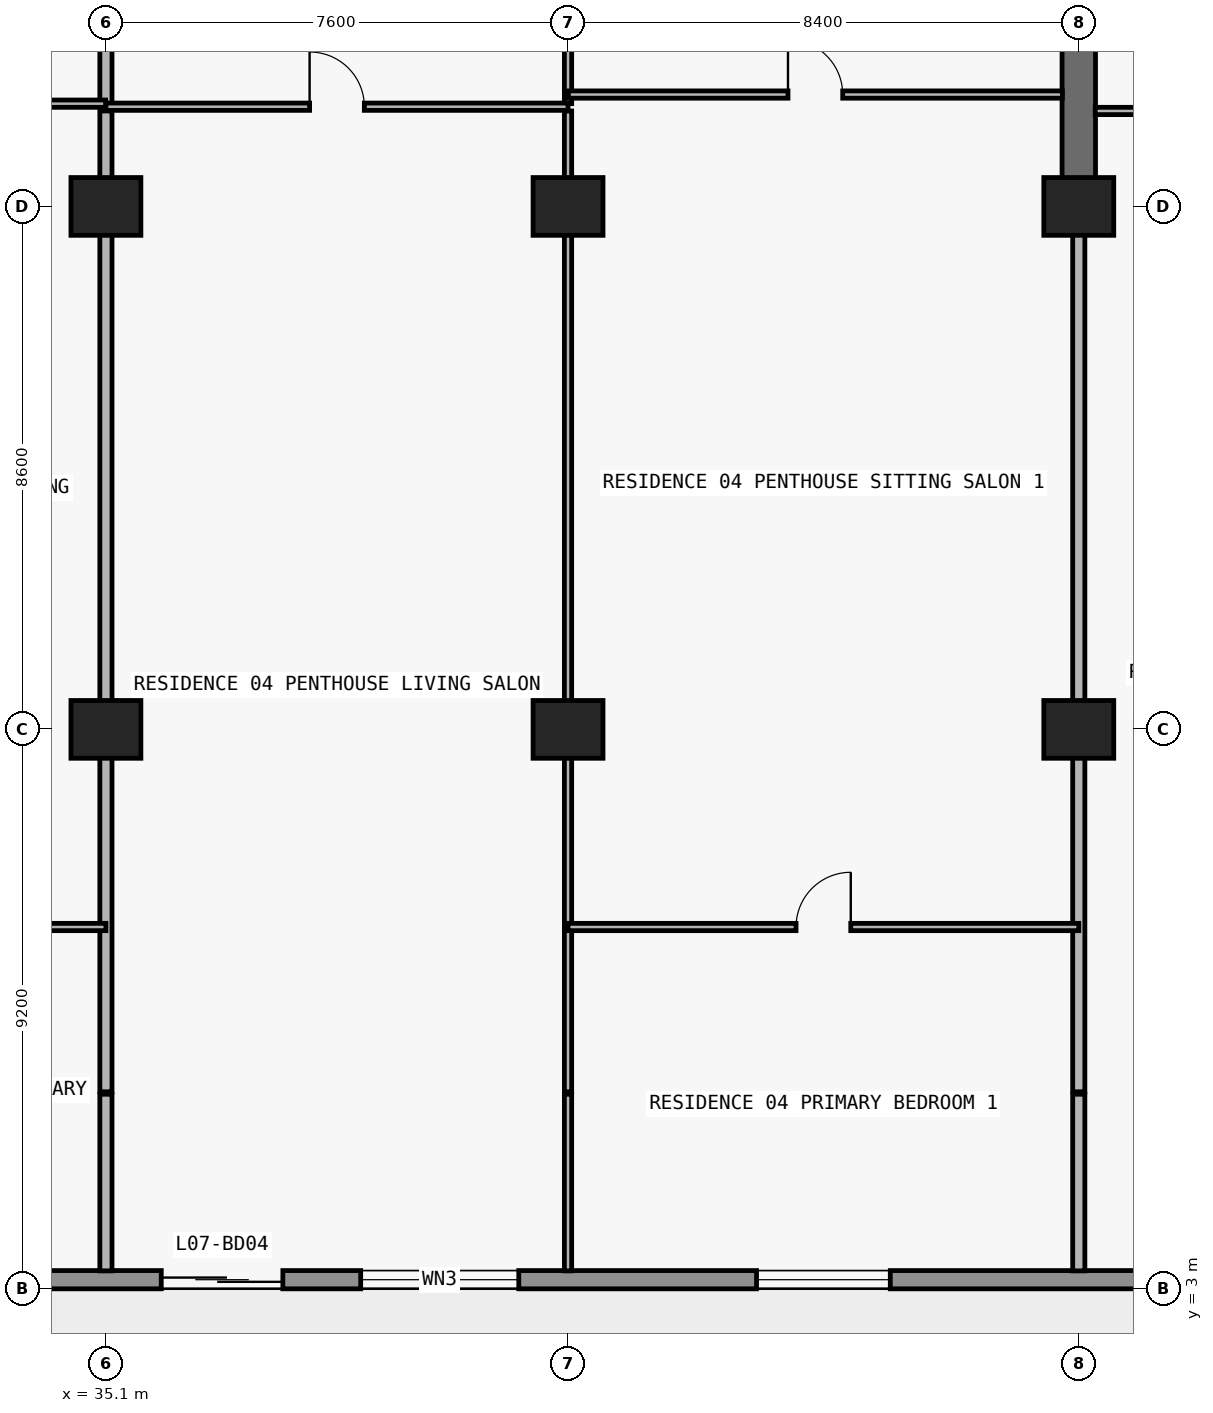
"""IFC4 building model, lengths in metres.
Left out: names, types, materials, properties, quantities, classifications, styles, units other than length and angle.
Written with IfcOpenShell. Run it as: python <this file> out.ifc"""

import sys

from ifc_helpers import new_model, si_unit, direction, frame, frame_2d, origin, origin_2d, place, context, subcontext, project, spatial, rectangle, extrude, element, fill, save


model = new_model("IFC4")
c1 = context("Model", 3, precision=1e-05, world=origin(), true_north=direction((0.0, 1.0)))
c2 = subcontext(c1, "Body", "Model", "MODEL_VIEW")
j1 = project(units=[si_unit("LENGTHUNIT", "METRE"), si_unit("PLANEANGLEUNIT", "RADIAN")], contexts=[c1])
p1 = place(None, origin())
s1 = spatial("IfcSite", under=j1, at=p1, CompositionType="ELEMENT")
p2 = place(p1, origin())
s2 = spatial("IfcBuilding", under=s1, at=p2, CompositionType="ELEMENT")
p3 = place(p2, frame((0.0, 0.0, 33.3)))
s3 = spatial("IfcBuildingStorey", under=s2, at=p3, CompositionType="ELEMENT", Elevation=33.3)
for number, where, z_axis, x_axis in (
    (1, (35.1, 12.2, 0.0), (0.0, 0.0, 1.0), (1.0, 0.0, 0.0)),
    (2, (42.7, 12.2, 0.0), (0.0, 0.0, 1.0), (1.0, 0.0, 0.0)),
    (3, (51.1, 12.2, 0.0), (0.0, 0.0, 1.0), (1.0, 0.0, 0.0)),
    (4, (35.1, 20.8, 0.0), (0.0, 0.0, 1.0), (1.0, 0.0, 0.0)),
    (5, (42.7, 20.8, 0.0), (0.0, 0.0, 1.0), (1.0, 0.0, 0.0)),
    (6, (51.1, 20.8, 0.0), (0.0, 0.0, 1.0), (1.0, 0.0, 0.0)),
):
    element("IfcColumn", number, at=place(p3, frame(where, z_axis=z_axis, x_axis=x_axis)), inside=s3, PredefinedType="COLUMN", context=c2, shape_type="SweptSolid", body=[
        extrude(rectangle(XDim=1.15, YDim=0.95, at=origin_2d()), origin(), (0.0, 0.0, 1.0), 3.05),
    ])
p4 = place(p3, frame((51.1, 20.8, 0.0), z_axis=(0.0, 0.0, 1.0), x_axis=(0.0, 1.0, 0.0)))
e7 = element("IfcWall", 7, at=p4, inside=s3, PredefinedType="SHEAR", context=c2, shape_type="SweptSolid", body=[
    extrude(rectangle(XDim=8.6, YDim=0.55, at=frame_2d((4.3, 0.0))), origin(), (0.0, 0.0, 1.0), 3.05),
])
p5 = place(p3, frame((72.7, 3.15, 0.0), z_axis=(0.0, 0.0, 1.0), x_axis=(-1.0, 0.0, 0.0)))
e8 = element("IfcWall", 8, at=p5, inside=s3, PredefinedType="STANDARD", context=c2, shape_type="SweptSolid", body=[
    extrude(rectangle(XDim=67.6, YDim=0.3, at=frame_2d((33.8, 0.0))), origin(), (0.0, 0.0, 1.0), 3.05),
])
p6 = place(p5, frame((59.826, 0.0, 0.0)))
e9 = element("IfcOpeningElement", 9, at=p6, cuts=e8, PredefinedType="OPENING", context=c2, shape_type="SweptSolid", body=[
    extrude(rectangle(XDim=2.0, YDim=2.3, at=frame_2d((1.0, 1.15))), frame((0.0, 0.16, 0.0), z_axis=(0.0, -1.0, 0.0), x_axis=(1.0, 0.0, 0.0)), (0.0, 0.0, 1.0), 0.32),
])
p7 = place(p5, frame((55.526, 0.0, 0.85)))
e10 = element("IfcOpeningElement", 10, at=p7, cuts=e8, PredefinedType="OPENING", context=c2, shape_type="SweptSolid", body=[
    extrude(rectangle(XDim=2.2, YDim=1.55, at=frame_2d((1.1, 0.775))), frame((0.0, 0.16, 0.0), z_axis=(0.0, -1.0, 0.0), x_axis=(1.0, 0.0, 0.0)), (0.0, 0.0, 1.0), 0.32),
])
p8 = place(p5, frame((51.09, 0.0, 0.0)))
e11 = element("IfcOpeningElement", 11, at=p8, cuts=e8, PredefinedType="OPENING", context=c2, shape_type="SweptSolid", body=[
    extrude(rectangle(XDim=2.0, YDim=2.3, at=frame_2d((1.0, 1.15))), frame((0.0, 0.16, 0.0), z_axis=(0.0, -1.0, 0.0), x_axis=(1.0, 0.0, 0.0)), (0.0, 0.0, 1.0), 0.32),
])
p9 = place(p5, frame((46.99, 0.0, 0.85)))
e12 = element("IfcOpeningElement", 12, at=p9, cuts=e8, PredefinedType="OPENING", context=c2, shape_type="SweptSolid", body=[
    extrude(rectangle(XDim=1.8, YDim=1.55, at=frame_2d((0.9, 0.775))), frame((0.0, 0.16, 0.0), z_axis=(0.0, -1.0, 0.0), x_axis=(1.0, 0.0, 0.0)), (0.0, 0.0, 1.0), 0.32),
])
p10 = place(p5, frame((43.026, 0.0, 0.0)))
e13 = element("IfcOpeningElement", 13, at=p10, cuts=e8, PredefinedType="OPENING", context=c2, shape_type="SweptSolid", body=[
    extrude(rectangle(XDim=2.0, YDim=2.3, at=frame_2d((1.0, 1.15))), frame((0.0, 0.16, 0.0), z_axis=(0.0, -1.0, 0.0), x_axis=(1.0, 0.0, 0.0)), (0.0, 0.0, 1.0), 0.32),
])
p11 = place(p5, frame((38.726, 0.0, 0.85)))
e14 = element("IfcOpeningElement", 14, at=p11, cuts=e8, PredefinedType="OPENING", context=c2, shape_type="SweptSolid", body=[
    extrude(rectangle(XDim=2.2, YDim=1.55, at=frame_2d((1.1, 0.775))), frame((0.0, 0.16, 0.0), z_axis=(0.0, -1.0, 0.0), x_axis=(1.0, 0.0, 0.0)), (0.0, 0.0, 1.0), 0.32),
])
p12 = place(p5, frame((34.69, 0.0, 0.0)))
e15 = element("IfcOpeningElement", 15, at=p12, cuts=e8, PredefinedType="OPENING", context=c2, shape_type="SweptSolid", body=[
    extrude(rectangle(XDim=2.0, YDim=2.3, at=frame_2d((1.0, 1.15))), frame((0.0, 0.16, 0.0), z_axis=(0.0, -1.0, 0.0), x_axis=(1.0, 0.0, 0.0)), (0.0, 0.0, 1.0), 0.32),
])
p13 = place(p5, frame((30.81, 0.0, 0.65)))
e16 = element("IfcOpeningElement", 16, at=p13, cuts=e8, PredefinedType="OPENING", context=c2, shape_type="SweptSolid", body=[
    extrude(rectangle(XDim=2.6, YDim=1.85, at=frame_2d((1.3, 0.925))), frame((0.0, 0.16, 0.0), z_axis=(0.0, -1.0, 0.0), x_axis=(1.0, 0.0, 0.0)), (0.0, 0.0, 1.0), 0.32),
])
p14 = place(p5, frame((24.7, 0.0, 0.85)))
e17 = element("IfcOpeningElement", 17, at=p14, cuts=e8, PredefinedType="OPENING", context=c2, shape_type="SweptSolid", body=[
    extrude(rectangle(XDim=2.2, YDim=1.55, at=frame_2d((1.1, 0.775))), frame((0.0, 0.16, 0.0), z_axis=(0.0, -1.0, 0.0), x_axis=(1.0, 0.0, 0.0)), (0.0, 0.0, 1.0), 0.32),
])
p15 = place(p5, frame((18.626, 0.0, 0.0)))
e18 = element("IfcOpeningElement", 18, at=p15, cuts=e8, PredefinedType="OPENING", context=c2, shape_type="SweptSolid", body=[
    extrude(rectangle(XDim=2.0, YDim=2.3, at=frame_2d((1.0, 1.15))), frame((0.0, 0.16, 0.0), z_axis=(0.0, -1.0, 0.0), x_axis=(1.0, 0.0, 0.0)), (0.0, 0.0, 1.0), 0.32),
])
p16 = place(p5, frame((14.326, 0.0, 0.85)))
e19 = element("IfcOpeningElement", 19, at=p16, cuts=e8, PredefinedType="OPENING", context=c2, shape_type="SweptSolid", body=[
    extrude(rectangle(XDim=2.2, YDim=1.55, at=frame_2d((1.1, 0.775))), frame((0.0, 0.16, 0.0), z_axis=(0.0, -1.0, 0.0), x_axis=(1.0, 0.0, 0.0)), (0.0, 0.0, 1.0), 0.32),
])
p17 = place(p5, frame((9.89, 0.0, 0.0)))
e20 = element("IfcOpeningElement", 20, at=p17, cuts=e8, PredefinedType="OPENING", context=c2, shape_type="SweptSolid", body=[
    extrude(rectangle(XDim=2.0, YDim=2.3, at=frame_2d((1.0, 1.15))), frame((0.0, 0.16, 0.0), z_axis=(0.0, -1.0, 0.0), x_axis=(1.0, 0.0, 0.0)), (0.0, 0.0, 1.0), 0.32),
])
p18 = place(p5, frame((5.79, 0.0, 0.85)))
e21 = element("IfcOpeningElement", 21, at=p18, cuts=e8, PredefinedType="OPENING", context=c2, shape_type="SweptSolid", body=[
    extrude(rectangle(XDim=1.8, YDim=1.55, at=frame_2d((0.9, 0.775))), frame((0.0, 0.16, 0.0), z_axis=(0.0, -1.0, 0.0), x_axis=(1.0, 0.0, 0.0)), (0.0, 0.0, 1.0), 0.32),
])
p19 = place(p3, frame((35.1, 3.295, 0.0), z_axis=(0.0, 0.0, 1.0), x_axis=(0.0, 1.0, 0.0)))
e22 = element("IfcWall", 22, at=p19, inside=s3, PredefinedType="PARTITIONING", context=c2, shape_type="SweptSolid", body=[
    extrude(rectangle(XDim=2.905, YDim=0.2, at=frame_2d((1.453, 0.0))), origin(), (0.0, 0.0, 1.0), 3.05),
])
p20 = place(p3, frame((35.1, 6.24, 0.0), z_axis=(0.0, 0.0, 1.0), x_axis=(0.0, 1.0, 0.0)))
e23 = element("IfcWall", 23, at=p20, inside=s3, PredefinedType="PARTITIONING", context=c2, shape_type="SweptSolid", body=[
    extrude(rectangle(XDim=16.13, YDim=0.2, at=frame_2d((8.065, 0.0))), origin(), (0.0, 0.0, 1.0), 2.11),
])
p21 = place(p3, frame((35.1, 22.49, 0.0), z_axis=(0.0, 0.0, 1.0), x_axis=(0.0, 1.0, 0.0)))
e24 = element("IfcWall", 24, at=p21, inside=s3, PredefinedType="PARTITIONING", context=c2, shape_type="SweptSolid", body=[
    extrude(rectangle(XDim=4.69, YDim=0.2, at=frame_2d((2.345, 0.0))), origin(), (0.0, 0.0, 1.0), 2.11),
])
p22 = place(p3, frame((42.7, 3.295, 0.0), z_axis=(0.0, 0.0, 1.0), x_axis=(0.0, 1.0, 0.0)))
e25 = element("IfcWall", 25, at=p22, inside=s3, PredefinedType="PARTITIONING", context=c2, shape_type="SweptSolid", body=[
    extrude(rectangle(XDim=2.905, YDim=0.12, at=frame_2d((1.453, 0.0))), origin(), (0.0, 0.0, 1.0), 3.05),
])
p23 = place(p3, frame((42.7, 6.24, 0.0), z_axis=(0.0, 0.0, 1.0), x_axis=(0.0, 1.0, 0.0)))
e26 = element("IfcWall", 26, at=p23, inside=s3, PredefinedType="PARTITIONING", context=c2, shape_type="SweptSolid", body=[
    extrude(rectangle(XDim=16.13, YDim=0.12, at=frame_2d((8.065, 0.0))), origin(), (0.0, 0.0, 1.0), 2.11),
])
p24 = place(p3, frame((42.7, 22.49, 0.0), z_axis=(0.0, 0.0, 1.0), x_axis=(0.0, 1.0, 0.0)))
e27 = element("IfcWall", 27, at=p24, inside=s3, PredefinedType="PARTITIONING", context=c2, shape_type="SweptSolid", body=[
    extrude(rectangle(XDim=4.69, YDim=0.12, at=frame_2d((2.345, 0.0))), origin(), (0.0, 0.0, 1.0), 2.11),
])
p25 = place(p24, frame((1.9, 0.0, 0.0)))
e28 = element("IfcOpeningElement", 28, at=p25, cuts=e27, PredefinedType="OPENING", context=c2, shape_type="SweptSolid", body=[
    extrude(rectangle(XDim=0.9, YDim=2.06, at=frame_2d((0.45, 1.03))), frame((0.0, 0.07, 0.0), z_axis=(0.0, -1.0, 0.0), x_axis=(1.0, 0.0, 0.0)), (0.0, 0.0, 1.0), 0.14),
])
p26 = place(p3, frame((51.1, 3.295, 0.0), z_axis=(0.0, 0.0, 1.0), x_axis=(0.0, 1.0, 0.0)))
e29 = element("IfcWall", 29, at=p26, inside=s3, PredefinedType="PARTITIONING", context=c2, shape_type="SweptSolid", body=[
    extrude(rectangle(XDim=2.905, YDim=0.2, at=frame_2d((1.453, 0.0))), origin(), (0.0, 0.0, 1.0), 3.05),
])
p27 = place(p3, frame((51.1, 6.24, 0.0), z_axis=(0.0, 0.0, 1.0), x_axis=(0.0, 1.0, 0.0)))
e30 = element("IfcWall", 30, at=p27, inside=s3, PredefinedType="PARTITIONING", context=c2, shape_type="SweptSolid", body=[
    extrude(rectangle(XDim=14.555, YDim=0.2, at=frame_2d((7.277, 0.0))), origin(), (0.0, 0.0, 1.0), 2.11),
])
p28 = place(p3, frame((30.648, 8.95, 0.0), z_axis=(0.0, 0.0, 1.0), x_axis=(1.0, 0.0, 0.0)))
e31 = element("IfcWall", 31, at=p28, inside=s3, PredefinedType="PARTITIONING", context=c2, shape_type="SweptSolid", body=[
    extrude(rectangle(XDim=4.452, YDim=0.12, at=frame_2d((2.226, 0.0))), origin(), (0.0, 0.0, 1.0), 3.05),
])
p29 = place(p28, frame((1.776, 0.0, 0.0)))
e32 = element("IfcOpeningElement", 32, at=p29, cuts=e31, PredefinedType="OPENING", context=c2, shape_type="SweptSolid", body=[
    extrude(rectangle(XDim=0.9, YDim=2.15, at=frame_2d((0.45, 1.075))), frame((0.0, 0.07, 0.0), z_axis=(0.0, -1.0, 0.0), x_axis=(1.0, 0.0, 0.0)), (0.0, 0.0, 1.0), 0.14),
])
p30 = place(p3, frame((42.7, 8.95, 0.0), z_axis=(0.0, 0.0, 1.0), x_axis=(1.0, 0.0, 0.0)))
e33 = element("IfcWall", 33, at=p30, inside=s3, PredefinedType="PARTITIONING", context=c2, shape_type="SweptSolid", body=[
    extrude(rectangle(XDim=8.4, YDim=0.12, at=frame_2d((4.2, 0.0))), origin(), (0.0, 0.0, 1.0), 3.05),
])
p31 = place(p30, frame((3.75, 0.0, 0.0)))
e34 = element("IfcOpeningElement", 34, at=p31, cuts=e33, PredefinedType="OPENING", context=c2, shape_type="SweptSolid", body=[
    extrude(rectangle(XDim=0.9, YDim=2.15, at=frame_2d((0.45, 1.075))), frame((0.0, 0.07, 0.0), z_axis=(0.0, -1.0, 0.0), x_axis=(1.0, 0.0, 0.0)), (0.0, 0.0, 1.0), 0.14),
])
p32 = place(p3, frame((51.37, 22.37, 0.0), z_axis=(0.0, 0.0, 1.0), x_axis=(1.0, 0.0, 0.0)))
e35 = element("IfcWall", 35, at=p32, inside=s3, PredefinedType="PARTITIONING", context=c2, shape_type="SweptSolid", body=[
    extrude(rectangle(XDim=4.516, YDim=0.12, at=frame_2d((2.258, 0.0))), origin(), (0.0, 0.0, 1.0), 3.05),
])
p33 = place(p32, frame((1.389, 0.0, 0.0)))
e36 = element("IfcOpeningElement", 36, at=p33, cuts=e35, PredefinedType="OPENING", context=c2, shape_type="SweptSolid", body=[
    extrude(rectangle(XDim=0.9, YDim=2.15, at=frame_2d((0.45, 1.075))), frame((0.0, 0.07, 0.0), z_axis=(0.0, -1.0, 0.0), x_axis=(1.0, 0.0, 0.0)), (0.0, 0.0, 1.0), 0.14),
])
p34 = place(p3, frame((35.1, 22.44, 0.0), z_axis=(0.0, 0.0, 1.0), x_axis=(1.0, 0.0, 0.0)))
e37 = element("IfcWall", 37, at=p34, inside=s3, PredefinedType="PARTITIONING", context=c2, shape_type="SweptSolid", body=[
    extrude(rectangle(XDim=7.6, YDim=0.12, at=frame_2d((3.8, 0.0))), origin(), (0.0, 0.0, 1.0), 3.05),
])
p35 = place(p34, frame((3.35, 0.0, 0.0)))
e38 = element("IfcOpeningElement", 38, at=p35, cuts=e37, PredefinedType="OPENING", context=c2, shape_type="SweptSolid", body=[
    extrude(rectangle(XDim=0.9, YDim=2.15, at=frame_2d((0.45, 1.075))), frame((0.0, 0.07, 0.0), z_axis=(0.0, -1.0, 0.0), x_axis=(1.0, 0.0, 0.0)), (0.0, 0.0, 1.0), 0.14),
])
p36 = place(p3, frame((26.97, 22.49, 0.0), z_axis=(0.0, 0.0, 1.0), x_axis=(1.0, 0.0, 0.0)))
e39 = element("IfcWall", 39, at=p36, inside=s3, PredefinedType="PARTITIONING", context=c2, shape_type="SweptSolid", body=[
    extrude(rectangle(XDim=8.125, YDim=0.12, at=frame_2d((4.062, 0.0))), origin(), (0.0, 0.0, 1.0), 3.05),
])
p37 = place(p36, frame((1.389, 0.0, 0.0)))
e40 = element("IfcOpeningElement", 40, at=p37, cuts=e39, PredefinedType="OPENING", context=c2, shape_type="SweptSolid", body=[
    extrude(rectangle(XDim=0.9, YDim=2.15, at=frame_2d((0.45, 1.075))), frame((0.0, 0.07, 0.0), z_axis=(0.0, -1.0, 0.0), x_axis=(1.0, 0.0, 0.0)), (0.0, 0.0, 1.0), 0.14),
])
p38 = place(p36, frame((5.621, 0.0, 0.0)))
e41 = element("IfcOpeningElement", 41, at=p38, cuts=e39, PredefinedType="OPENING", context=c2, shape_type="SweptSolid", body=[
    extrude(rectangle(XDim=0.9, YDim=2.15, at=frame_2d((0.45, 1.075))), frame((0.0, 0.07, 0.0), z_axis=(0.0, -1.0, 0.0), x_axis=(1.0, 0.0, 0.0)), (0.0, 0.0, 1.0), 0.14),
])
p39 = place(p3, frame((42.705, 22.64, 0.0), z_axis=(0.0, 0.0, 1.0), x_axis=(1.0, 0.0, 0.0)))
e42 = element("IfcWall", 42, at=p39, inside=s3, PredefinedType="PARTITIONING", context=c2, shape_type="SweptSolid", body=[
    extrude(rectangle(XDim=8.125, YDim=0.12, at=frame_2d((4.062, 0.0))), origin(), (0.0, 0.0, 1.0), 3.05),
])
p40 = place(p39, frame((3.613, 0.0, 0.0)))
e43 = element("IfcOpeningElement", 43, at=p40, cuts=e42, PredefinedType="OPENING", context=c2, shape_type="SweptSolid", body=[
    extrude(rectangle(XDim=0.9, YDim=2.15, at=frame_2d((0.45, 1.075))), frame((0.0, 0.07, 0.0), z_axis=(0.0, -1.0, 0.0), x_axis=(1.0, 0.0, 0.0)), (0.0, 0.0, 1.0), 0.14),
])
p41 = place(p12, origin())
e44 = element("IfcDoor", 44, at=p41, inside=s3, OperationType="DOUBLE_DOOR_SLIDING", PredefinedType="DOOR", context=c2, shape_type="SweptSolid", body=[
    extrude(rectangle(XDim=2.0, YDim=2.3, at=frame_2d((1.0, 1.15))), frame((0.0, 0.025, 0.0), z_axis=(0.0, -1.0, 0.0), x_axis=(1.0, 0.0, 0.0)), (0.0, 0.0, 1.0), 0.05),
])
fill(e15, e44)
p42 = place(p13, origin())
e45 = element("IfcWindow", 45, at=p42, inside=s3, PartitioningType="SINGLE_PANEL", PredefinedType="WINDOW", context=c2, shape_type="SweptSolid", body=[
    extrude(rectangle(XDim=2.6, YDim=1.85, at=frame_2d((1.3, 0.925))), frame((0.0, 0.03, 0.0), z_axis=(0.0, -1.0, 0.0), x_axis=(1.0, 0.0, 0.0)), (0.0, 0.0, 1.0), 0.06),
])
fill(e16, e45)
p43 = place(p14, origin())
e46 = element("IfcWindow", 46, at=p43, inside=s3, PartitioningType="SINGLE_PANEL", PredefinedType="WINDOW", context=c2, shape_type="SweptSolid", body=[
    extrude(rectangle(XDim=2.2, YDim=1.55, at=frame_2d((1.1, 0.775))), frame((0.0, 0.03, 0.0), z_axis=(0.0, -1.0, 0.0), x_axis=(1.0, 0.0, 0.0)), (0.0, 0.0, 1.0), 0.06),
])
fill(e17, e46)
p44 = place(p35, origin())
e47 = element("IfcDoor", 47, at=p44, inside=s3, OperationType="SINGLE_SWING_LEFT", PredefinedType="DOOR", context=c2, shape_type="SweptSolid", body=[
    extrude(rectangle(XDim=0.9, YDim=2.15, at=frame_2d((0.45, 1.075))), frame((0.0, 0.025, 0.0), z_axis=(0.0, -1.0, 0.0), x_axis=(1.0, 0.0, 0.0)), (0.0, 0.0, 1.0), 0.05),
])
fill(e38, e47)
p45 = place(p40, origin())
e48 = element("IfcDoor", 48, at=p45, inside=s3, OperationType="SINGLE_SWING_LEFT", PredefinedType="DOOR", context=c2, shape_type="SweptSolid", body=[
    extrude(rectangle(XDim=0.9, YDim=2.15, at=frame_2d((0.45, 1.075))), frame((0.0, 0.025, 0.0), z_axis=(0.0, -1.0, 0.0), x_axis=(1.0, 0.0, 0.0)), (0.0, 0.0, 1.0), 0.05),
])
fill(e43, e48)
p46 = place(p31, origin())
e49 = element("IfcDoor", 49, at=p46, inside=s3, OperationType="SINGLE_SWING_RIGHT", PredefinedType="DOOR", context=c2, shape_type="SweptSolid", body=[
    extrude(rectangle(XDim=0.9, YDim=2.15, at=frame_2d((0.45, 1.075))), frame((0.0, 0.025, 0.0), z_axis=(0.0, -1.0, 0.0), x_axis=(1.0, 0.0, 0.0)), (0.0, 0.0, 1.0), 0.05),
])
fill(e34, e49)
save(model, sys.argv[1])
